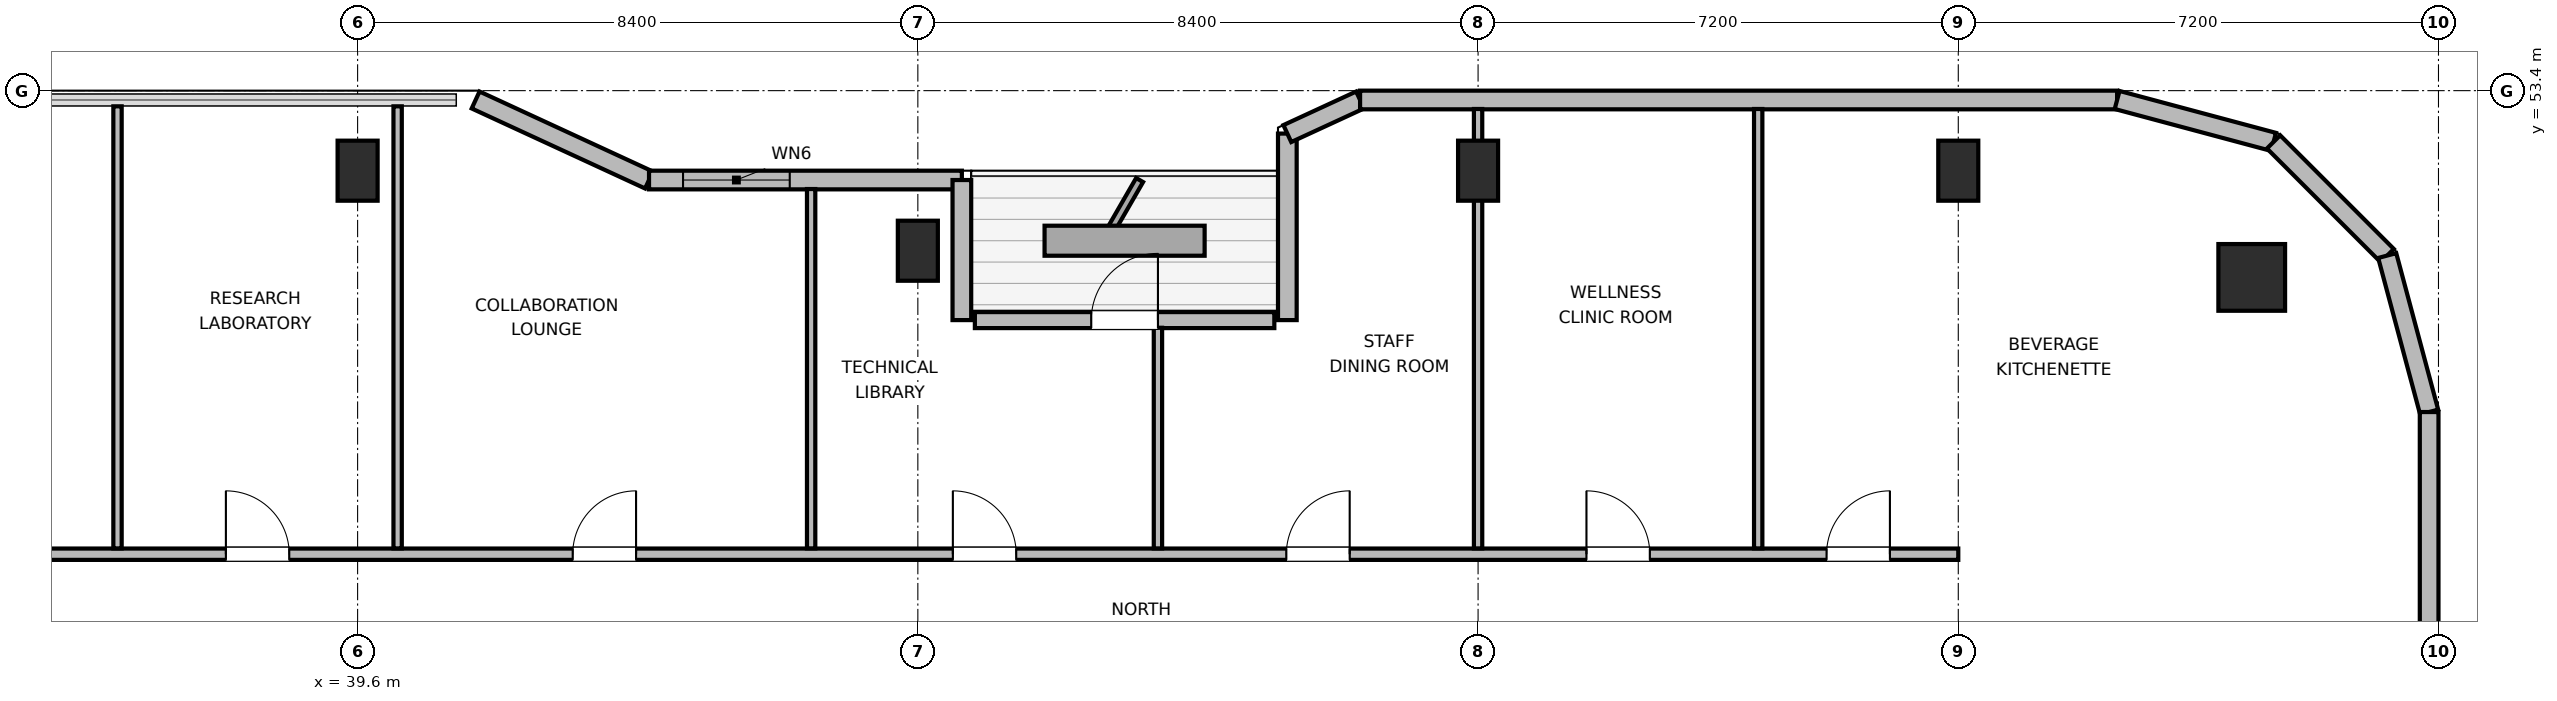
"""IFC4 building model, lengths in metres.
Left out: names, types, materials, properties, quantities, classifications, styles, units other than length and angle.
Written with IfcOpenShell. Run it as: python <this file> out.ifc"""

import sys

from ifc_helpers import new_model, si_unit, direction, frame, frame_2d, origin, origin_2d, place, context, subcontext, project, spatial, rectangle, circle, extrude, element, fill, save


model = new_model("IFC4")
c1 = context("Model", 3, precision=1e-05, world=origin(), true_north=direction((0.0, 1.0)))
c2 = subcontext(c1, "Body", "Model", "MODEL_VIEW")
j1 = project(units=[si_unit("LENGTHUNIT", "METRE"), si_unit("PLANEANGLEUNIT", "RADIAN")], contexts=[c1])
p1 = place(None, origin())
s1 = spatial("IfcSite", under=j1, at=p1, CompositionType="ELEMENT")
p2 = place(p1, origin())
s2 = spatial("IfcBuilding", under=s1, at=p2, CompositionType="ELEMENT")
p3 = place(p2, frame((0.0, 0.0, 274.5)))
s3 = spatial("IfcBuildingStorey", under=s2, at=p3, CompositionType="ELEMENT", Elevation=274.5)
p4 = place(p3, frame((68.0, 50.6, 0.0), z_axis=(0.0, 0.0, 1.0), x_axis=(1.0, 0.0, 0.0)))
e1 = element("IfcColumn", 1, at=p4, inside=s3, PredefinedType="COLUMN", context=c2, shape_type="SweptSolid", body=[
    extrude(circle(Radius=0.5, at=origin_2d()), origin(), (0.0, 0.0, 1.0), 3.9),
])
for number, where, z_axis, x_axis in (
    (2, (39.6, 52.2, 0.0), (0.0, 0.0, 1.0), (1.0, 0.0, 0.0)),
    (3, (48.0, 51.0, 0.0), (0.0, 0.0, 1.0), (1.0, 0.0, 0.0)),
    (4, (56.4, 52.2, 0.0), (0.0, 0.0, 1.0), (1.0, 0.0, 0.0)),
    (5, (63.6, 52.2, 0.0), (0.0, 0.0, 1.0), (1.0, 0.0, 0.0)),
):
    element("IfcColumn", number, at=place(p3, frame(where, z_axis=z_axis, x_axis=x_axis)), inside=s3, PredefinedType="COLUMN", context=c2, shape_type="SweptSolid", body=[
        extrude(rectangle(XDim=0.6, YDim=0.9, at=origin_2d()), origin(), (0.0, 0.0, 1.0), 3.9),
    ])
p5 = place(p3, frame((41.369, 53.26, 0.0), z_axis=(0.0, 0.0, 1.0), x_axis=(0.907956889006, -0.419063584324, 0.0)))
e6 = element("IfcWall", 6, at=p5, inside=s3, PredefinedType="SOLIDWALL", context=c2, shape_type="SweptSolid", body=[
    extrude(rectangle(XDim=2.864, YDim=0.28, at=frame_2d((1.432, 0.0))), origin(), (0.0, 0.0, 1.0), 2.265),
])
p6 = place(p3, frame((43.969, 52.06, 0.0), z_axis=(0.0, 0.0, 1.0), x_axis=(1.0, 0.0, 0.0)))
e7 = element("IfcWall", 7, at=p6, inside=s3, PredefinedType="SOLIDWALL", context=c2, shape_type="SweptSolid", body=[
    extrude(rectangle(XDim=4.691, YDim=0.28, at=frame_2d((2.345, 0.0))), origin(), (0.0, 0.0, 1.0), 2.265),
])
p7 = place(p6, frame((0.51, 0.0, 0.85)))
e8 = element("IfcOpeningElement", 8, at=p7, cuts=e7, PredefinedType="OPENING", context=c2, shape_type="SweptSolid", body=[
    extrude(rectangle(XDim=1.6, YDim=1.0, at=frame_2d((0.8, 0.5))), frame((0.0, 0.15, 0.0), z_axis=(0.0, -1.0, 0.0), x_axis=(1.0, 0.0, 0.0)), (0.0, 0.0, 1.0), 0.3),
])
p8 = place(p3, frame((48.66, 52.06, 0.0), z_axis=(0.0, 0.0, 1.0), x_axis=(0.0, -1.0, 0.0)))
e9 = element("IfcWall", 9, at=p8, inside=s3, PredefinedType="SOLIDWALL", context=c2, shape_type="SweptSolid", body=[
    extrude(rectangle(XDim=2.1, YDim=0.28, at=frame_2d((1.05, 0.0))), origin(), (0.0, 0.0, 1.0), 2.265),
])
p9 = place(p3, frame((48.855, 49.96, 0.0), z_axis=(0.0, 0.0, 1.0), x_axis=(1.0, 0.0, 0.0)))
e10 = element("IfcWall", 10, at=p9, inside=s3, PredefinedType="SOLIDWALL", context=c2, shape_type="SweptSolid", body=[
    extrude(rectangle(XDim=4.49, YDim=0.24, at=frame_2d((2.245, 0.0))), origin(), (0.0, 0.0, 1.0), 3.68),
])
p10 = place(p9, frame((1.745, 0.0, 0.0)))
e11 = element("IfcOpeningElement", 11, at=p10, cuts=e10, PredefinedType="OPENING", context=c2, shape_type="SweptSolid", body=[
    extrude(rectangle(XDim=1.0, YDim=2.02, at=frame_2d((0.5, 1.01))), frame((0.0, 0.13, 0.0), z_axis=(0.0, -1.0, 0.0), x_axis=(1.0, 0.0, 0.0)), (0.0, 0.0, 1.0), 0.26),
])
p11 = place(p3, frame((53.54, 49.96, 0.0), z_axis=(0.0, 0.0, 1.0), x_axis=(0.0, 1.0, 0.0)))
e12 = element("IfcWall", 12, at=p11, inside=s3, PredefinedType="SOLIDWALL", context=c2, shape_type="SweptSolid", body=[
    extrude(rectangle(XDim=2.796, YDim=0.28, at=frame_2d((1.398, 0.0))), origin(), (0.0, 0.0, 1.0), 2.265),
])
p12 = place(p3, frame((53.54, 52.756, 0.0), z_axis=(0.0, 0.0, 1.0), x_axis=(0.907893953211, 0.419199916176, 0.0)))
e13 = element("IfcWall", 13, at=p12, inside=s3, PredefinedType="SOLIDWALL", context=c2, shape_type="SweptSolid", body=[
    extrude(rectangle(XDim=1.201, YDim=0.28, at=frame_2d((0.601, 0.0))), origin(), (0.0, 0.0, 1.0), 3.68),
])
p13 = place(p3, frame((54.631, 53.26, 0.0), z_axis=(0.0, 0.0, 1.0), x_axis=(1.0, 0.0, 0.0)))
e14 = element("IfcWall", 14, at=p13, inside=s3, PredefinedType="SOLIDWALL", context=c2, shape_type="SweptSolid", body=[
    extrude(rectangle(XDim=11.351, YDim=0.28, at=frame_2d((5.675, 0.0))), origin(), (0.0, 0.0, 1.0), 3.68),
])
p14 = place(p3, frame((65.982, 53.26, 0.0), z_axis=(0.0, 0.0, 1.0), x_axis=(0.965937282298, -0.25877628691, 0.0)))
e15 = element("IfcWall", 15, at=p14, inside=s3, PredefinedType="SOLIDWALL", context=c2, shape_type="SweptSolid", body=[
    extrude(rectangle(XDim=2.428, YDim=0.28, at=frame_2d((1.214, 0.0))), origin(), (0.0, 0.0, 1.0), 3.68),
])
p15 = place(p3, frame((68.327, 52.632, 0.0), z_axis=(0.0, 0.0, 1.0), x_axis=(0.707106781187, -0.707106781187, 0.0)))
e16 = element("IfcWall", 16, at=p15, inside=s3, PredefinedType="SOLIDWALL", context=c2, shape_type="SweptSolid", body=[
    extrude(rectangle(XDim=2.41, YDim=0.28, at=frame_2d((1.205, 0.0))), origin(), (0.0, 0.0, 1.0), 3.68),
])
p16 = place(p3, frame((70.031, 50.927, 0.0), z_axis=(0.0, 0.0, 1.0), x_axis=(0.258751159445, -0.965944013639, 0.0)))
e17 = element("IfcWall", 17, at=p16, inside=s3, PredefinedType="SOLIDWALL", context=c2, shape_type="SweptSolid", body=[
    extrude(rectangle(XDim=2.429, YDim=0.28, at=frame_2d((1.214, 0.0))), origin(), (0.0, 0.0, 1.0), 3.68),
])
p17 = place(p3, frame((70.66, 48.582, 0.0), z_axis=(0.0, 0.0, 1.0), x_axis=(0.0, -1.0, 0.0)))
e18 = element("IfcWall", 18, at=p17, inside=s3, PredefinedType="SOLIDWALL", context=c2, shape_type="SweptSolid", body=[
    extrude(rectangle(XDim=5.842, YDim=0.28, at=frame_2d((2.921, 0.0))), origin(), (0.0, 0.0, 1.0), 3.68),
])
p18 = place(p3, frame((30.35, 46.45, 0.0), z_axis=(0.0, 0.0, 1.0), x_axis=(1.0, 0.0, 0.0)))
e19 = element("IfcWall", 19, at=p18, inside=s3, PredefinedType="PARTITIONING", context=c2, shape_type="SweptSolid", body=[
    extrude(rectangle(XDim=33.25, YDim=0.17, at=frame_2d((16.625, 0.0))), origin(), (0.0, 0.0, 1.0), 3.68),
])
p19 = place(p18, frame((2.35, 0.0, 0.0)))
e20 = element("IfcOpeningElement", 20, at=p19, cuts=e19, PredefinedType="OPENING", context=c2, shape_type="SweptSolid", body=[
    extrude(rectangle(XDim=0.95, YDim=2.04, at=frame_2d((0.475, 1.02))), frame((0.0, 0.095, 0.0), z_axis=(0.0, -1.0, 0.0), x_axis=(1.0, 0.0, 0.0)), (0.0, 0.0, 1.0), 0.19),
])
p20 = place(p18, frame((7.275, 0.0, 0.0)))
e21 = element("IfcOpeningElement", 21, at=p20, cuts=e19, PredefinedType="OPENING", context=c2, shape_type="SweptSolid", body=[
    extrude(rectangle(XDim=0.95, YDim=2.04, at=frame_2d((0.475, 1.02))), frame((0.0, 0.095, 0.0), z_axis=(0.0, -1.0, 0.0), x_axis=(1.0, 0.0, 0.0)), (0.0, 0.0, 1.0), 0.19),
])
p21 = place(p18, frame((12.475, 0.0, 0.0)))
e22 = element("IfcOpeningElement", 22, at=p21, cuts=e19, PredefinedType="OPENING", context=c2, shape_type="SweptSolid", body=[
    extrude(rectangle(XDim=0.95, YDim=2.04, at=frame_2d((0.475, 1.02))), frame((0.0, 0.095, 0.0), z_axis=(0.0, -1.0, 0.0), x_axis=(1.0, 0.0, 0.0)), (0.0, 0.0, 1.0), 0.19),
])
p22 = place(p18, frame((18.175, 0.0, 0.0)))
e23 = element("IfcOpeningElement", 23, at=p22, cuts=e19, PredefinedType="OPENING", context=c2, shape_type="SweptSolid", body=[
    extrude(rectangle(XDim=0.95, YDim=2.04, at=frame_2d((0.475, 1.02))), frame((0.0, 0.095, 0.0), z_axis=(0.0, -1.0, 0.0), x_axis=(1.0, 0.0, 0.0)), (0.0, 0.0, 1.0), 0.19),
])
p23 = place(p18, frame((23.175, 0.0, 0.0)))
e24 = element("IfcOpeningElement", 24, at=p23, cuts=e19, PredefinedType="OPENING", context=c2, shape_type="SweptSolid", body=[
    extrude(rectangle(XDim=0.95, YDim=2.04, at=frame_2d((0.475, 1.02))), frame((0.0, 0.095, 0.0), z_axis=(0.0, -1.0, 0.0), x_axis=(1.0, 0.0, 0.0)), (0.0, 0.0, 1.0), 0.19),
])
p24 = place(p18, frame((27.675, 0.0, 0.0)))
e25 = element("IfcOpeningElement", 25, at=p24, cuts=e19, PredefinedType="OPENING", context=c2, shape_type="SweptSolid", body=[
    extrude(rectangle(XDim=0.95, YDim=2.04, at=frame_2d((0.475, 1.02))), frame((0.0, 0.095, 0.0), z_axis=(0.0, -1.0, 0.0), x_axis=(1.0, 0.0, 0.0)), (0.0, 0.0, 1.0), 0.19),
])
p25 = place(p18, frame((31.275, 0.0, 0.0)))
e26 = element("IfcOpeningElement", 26, at=p25, cuts=e19, PredefinedType="OPENING", context=c2, shape_type="SweptSolid", body=[
    extrude(rectangle(XDim=0.95, YDim=2.04, at=frame_2d((0.475, 1.02))), frame((0.0, 0.095, 0.0), z_axis=(0.0, -1.0, 0.0), x_axis=(1.0, 0.0, 0.0)), (0.0, 0.0, 1.0), 0.19),
])
p26 = place(p3, frame((36.0, 46.537, 0.0), z_axis=(0.0, 0.0, 1.0), x_axis=(0.0, 1.0, 0.0)))
e27 = element("IfcWall", 27, at=p26, inside=s3, PredefinedType="PARTITIONING", context=c2, shape_type="SweptSolid", body=[
    extrude(rectangle(XDim=6.628, YDim=0.125, at=frame_2d((3.314, 0.0))), origin(), (0.0, 0.0, 1.0), 3.68),
])
p27 = place(p3, frame((40.2, 46.537, 0.0), z_axis=(0.0, 0.0, 1.0), x_axis=(0.0, 1.0, 0.0)))
e28 = element("IfcWall", 28, at=p27, inside=s3, PredefinedType="PARTITIONING", context=c2, shape_type="SweptSolid", body=[
    extrude(rectangle(XDim=6.628, YDim=0.125, at=frame_2d((3.314, 0.0))), origin(), (0.0, 0.0, 1.0), 3.043),
])
p28 = place(p3, frame((46.4, 46.537, 0.0), z_axis=(0.0, 0.0, 1.0), x_axis=(0.0, 1.0, 0.0)))
e29 = element("IfcWall", 29, at=p28, inside=s3, PredefinedType="PARTITIONING", context=c2, shape_type="SweptSolid", body=[
    extrude(rectangle(XDim=5.388, YDim=0.125, at=frame_2d((2.694, 0.0))), origin(), (0.0, 0.0, 1.0), 3.68),
])
p29 = place(p3, frame((51.6, 46.537, 0.0), z_axis=(0.0, 0.0, 1.0), x_axis=(0.0, 1.0, 0.0)))
e30 = element("IfcWall", 30, at=p29, inside=s3, PredefinedType="PARTITIONING", context=c2, shape_type="SweptSolid", body=[
    extrude(rectangle(XDim=3.308, YDim=0.125, at=frame_2d((1.654, 0.0))), origin(), (0.0, 0.0, 1.0), 3.68),
])
p30 = place(p3, frame((56.4, 46.537, 0.0), z_axis=(0.0, 0.0, 1.0), x_axis=(0.0, 1.0, 0.0)))
e31 = element("IfcWall", 31, at=p30, inside=s3, PredefinedType="PARTITIONING", context=c2, shape_type="SweptSolid", body=[
    extrude(rectangle(XDim=6.588, YDim=0.125, at=frame_2d((3.294, 0.0))), origin(), (0.0, 0.0, 1.0), 3.043),
])
p31 = place(p3, frame((60.6, 46.537, 0.0), z_axis=(0.0, 0.0, 1.0), x_axis=(0.0, 1.0, 0.0)))
e32 = element("IfcWall", 32, at=p31, inside=s3, PredefinedType="PARTITIONING", context=c2, shape_type="SweptSolid", body=[
    extrude(rectangle(XDim=6.588, YDim=0.125, at=frame_2d((3.294, 0.0))), origin(), (0.0, 0.0, 1.0), 3.68),
])
p32 = place(p7, origin())
e33 = element("IfcWindow", 33, at=p32, inside=s3, PartitioningType="SINGLE_PANEL", PredefinedType="WINDOW", context=c2, shape_type="SweptSolid", body=[
    extrude(rectangle(XDim=1.6, YDim=1.0, at=frame_2d((0.8, 0.5))), frame((0.0, 0.03, 0.0), z_axis=(0.0, -1.0, 0.0), x_axis=(1.0, 0.0, 0.0)), (0.0, 0.0, 1.0), 0.06),
])
fill(e8, e33)
p33 = place(p10, origin())
e34 = element("IfcDoor", 34, at=p33, inside=s3, OperationType="SINGLE_SWING_RIGHT", PredefinedType="DOOR", context=c2, shape_type="SweptSolid", body=[
    extrude(rectangle(XDim=1.0, YDim=2.02, at=frame_2d((0.5, 1.01))), frame((0.0, 0.025, 0.0), z_axis=(0.0, -1.0, 0.0), x_axis=(1.0, 0.0, 0.0)), (0.0, 0.0, 1.0), 0.05),
])
fill(e11, e34)
p34 = place(p20, origin())
e35 = element("IfcDoor", 35, at=p34, inside=s3, OperationType="SINGLE_SWING_LEFT", PredefinedType="DOOR", context=c2, shape_type="SweptSolid", body=[
    extrude(rectangle(XDim=0.95, YDim=2.04, at=frame_2d((0.475, 1.02))), frame((0.0, 0.025, 0.0), z_axis=(0.0, -1.0, 0.0), x_axis=(1.0, 0.0, 0.0)), (0.0, 0.0, 1.0), 0.05),
])
fill(e21, e35)
p35 = place(p21, origin())
e36 = element("IfcDoor", 36, at=p35, inside=s3, OperationType="SINGLE_SWING_RIGHT", PredefinedType="DOOR", context=c2, shape_type="SweptSolid", body=[
    extrude(rectangle(XDim=0.95, YDim=2.04, at=frame_2d((0.475, 1.02))), frame((0.0, 0.025, 0.0), z_axis=(0.0, -1.0, 0.0), x_axis=(1.0, 0.0, 0.0)), (0.0, 0.0, 1.0), 0.05),
])
fill(e22, e36)
p36 = place(p22, origin())
e37 = element("IfcDoor", 37, at=p36, inside=s3, OperationType="SINGLE_SWING_LEFT", PredefinedType="DOOR", context=c2, shape_type="SweptSolid", body=[
    extrude(rectangle(XDim=0.95, YDim=2.04, at=frame_2d((0.475, 1.02))), frame((0.0, 0.025, 0.0), z_axis=(0.0, -1.0, 0.0), x_axis=(1.0, 0.0, 0.0)), (0.0, 0.0, 1.0), 0.05),
])
fill(e23, e37)
p37 = place(p23, origin())
e38 = element("IfcDoor", 38, at=p37, inside=s3, OperationType="SINGLE_SWING_RIGHT", PredefinedType="DOOR", context=c2, shape_type="SweptSolid", body=[
    extrude(rectangle(XDim=0.95, YDim=2.04, at=frame_2d((0.475, 1.02))), frame((0.0, 0.025, 0.0), z_axis=(0.0, -1.0, 0.0), x_axis=(1.0, 0.0, 0.0)), (0.0, 0.0, 1.0), 0.05),
])
fill(e24, e38)
p38 = place(p24, origin())
e39 = element("IfcDoor", 39, at=p38, inside=s3, OperationType="SINGLE_SWING_LEFT", PredefinedType="DOOR", context=c2, shape_type="SweptSolid", body=[
    extrude(rectangle(XDim=0.95, YDim=2.04, at=frame_2d((0.475, 1.02))), frame((0.0, 0.025, 0.0), z_axis=(0.0, -1.0, 0.0), x_axis=(1.0, 0.0, 0.0)), (0.0, 0.0, 1.0), 0.05),
])
fill(e25, e39)
p39 = place(p25, origin())
e40 = element("IfcDoor", 40, at=p39, inside=s3, OperationType="SINGLE_SWING_RIGHT", PredefinedType="DOOR", context=c2, shape_type="SweptSolid", body=[
    extrude(rectangle(XDim=0.95, YDim=2.04, at=frame_2d((0.475, 1.02))), frame((0.0, 0.025, 0.0), z_axis=(0.0, -1.0, 0.0), x_axis=(1.0, 0.0, 0.0)), (0.0, 0.0, 1.0), 0.05),
])
fill(e26, e40)
save(model, sys.argv[1])
